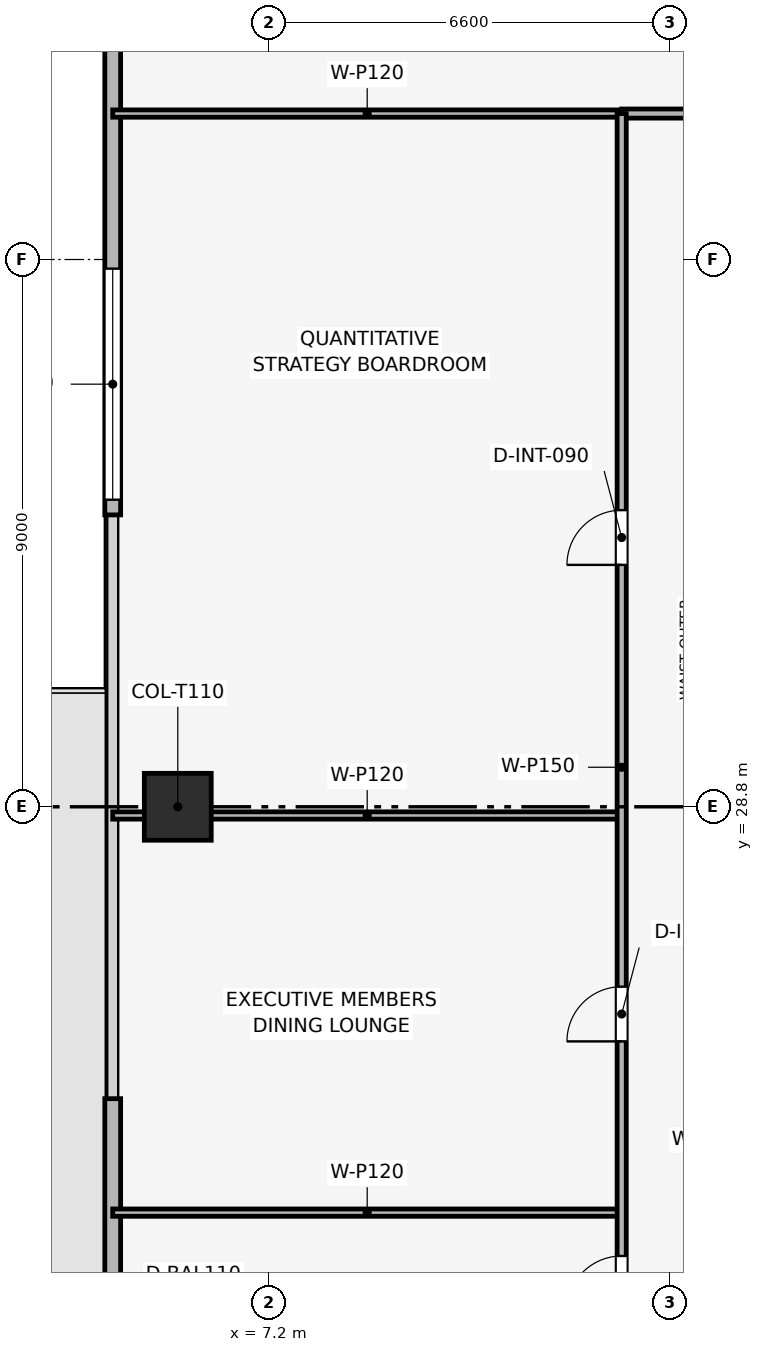
"""IFC4 building model, lengths in metres.
Left out: names, types, materials, properties, quantities, classifications, styles, units other than length and angle.
Written with IfcOpenShell. Run it as: python <this file> out.ifc"""

import sys

from ifc_helpers import new_model, si_unit, direction, frame, frame_2d, origin, origin_2d, place, context, subcontext, project, spatial, rectangle, extrude, element, fill, save


model = new_model("IFC4")
c1 = context("Model", 3, precision=1e-05, world=origin(), true_north=direction((0.0, 1.0)))
c2 = subcontext(c1, "Body", "Model", "MODEL_VIEW")
j1 = project(units=[si_unit("LENGTHUNIT", "METRE"), si_unit("PLANEANGLEUNIT", "RADIAN")], contexts=[c1])
p1 = place(None, origin())
s1 = spatial("IfcSite", under=j1, at=p1, CompositionType="ELEMENT")
p2 = place(p1, origin())
s2 = spatial("IfcBuilding", under=s1, at=p2, CompositionType="ELEMENT")
p3 = place(p2, frame((0.0, 0.0, 179.55)))
s3 = spatial("IfcBuildingStorey", under=s2, at=p3, CompositionType="ELEMENT", Elevation=179.55)
p4 = place(p3, frame((5.7, 28.8, 0.003), z_axis=(0.0, 0.0, 1.0), x_axis=(1.0, 0.0, 0.0)))
e1 = element("IfcColumn", 1, at=p4, inside=s3, PredefinedType="COLUMN", context=c2, shape_type="SweptSolid", body=[
    extrude(rectangle(XDim=1.1, YDim=1.1, at=origin_2d()), origin(), (0.0, 0.0, 1.0), 3.489),
])
p5 = place(p3, frame((4.63, 11.4, 0.0), z_axis=(0.0, 0.0, 1.0), x_axis=(0.0, 1.0, 0.0)))
e2 = element("IfcWall", 2, at=p5, inside=s3, PredefinedType="SOLIDWALL", context=c2, shape_type="SweptSolid", body=[
    extrude(rectangle(XDim=12.6, YDim=0.26, at=frame_2d((6.3, 0.0))), origin(), (0.0, 0.0, 1.0), 3.495),
])
p6 = place(p5, frame((7.822, 0.0, 0.0)))
e3 = element("IfcOpeningElement", 3, at=p6, cuts=e2, PredefinedType="OPENING", context=c2, shape_type="SweptSolid", body=[
    extrude(rectangle(XDim=1.1, YDim=2.2, at=frame_2d((0.55, 1.1))), frame((0.0, 0.14, 0.0), z_axis=(0.0, -1.0, 0.0), x_axis=(1.0, 0.0, 0.0)), (0.0, 0.0, 1.0), 0.28),
])
p7 = place(p3, frame((4.63, 33.6, 0.0), z_axis=(0.0, 0.0, 1.0), x_axis=(0.0, 1.0, 0.0)))
e4 = element("IfcWall", 4, at=p7, inside=s3, PredefinedType="SOLIDWALL", context=c2, shape_type="SweptSolid", body=[
    extrude(rectangle(XDim=12.6, YDim=0.26, at=frame_2d((6.3, 0.0))), origin(), (0.0, 0.0, 1.0), 3.495),
])
p8 = place(p7, frame((0.25, 0.0, 0.9)))
e5 = element("IfcOpeningElement", 5, at=p8, cuts=e4, PredefinedType="OPENING", context=c2, shape_type="SweptSolid", body=[
    extrude(rectangle(XDim=3.8, YDim=1.9, at=frame_2d((1.9, 0.95))), frame((0.0, 0.14, 0.0), z_axis=(0.0, -1.0, 0.0), x_axis=(1.0, 0.0, 0.0)), (0.0, 0.0, 1.0), 0.28),
])
for number, where, z_axis, x_axis in (
    (6, (4.63, 22.126, 0.0), (0.0, 0.0, 1.0), (1.0, 0.0, 0.0)),
    (7, (4.63, 28.657, 0.0), (0.0, 0.0, 1.0), (1.0, 0.0, 0.0)),
    (8, (4.63, 40.2, 0.0), (0.0, 0.0, 1.0), (1.0, 0.0, 0.0)),
):
    element("IfcWall", number, at=place(p3, frame(where, z_axis=z_axis, x_axis=x_axis)), inside=s3, PredefinedType="PARTITIONING", context=c2, shape_type="SweptSolid", body=[
        extrude(rectangle(XDim=8.37, YDim=0.12, at=frame_2d((4.185, 0.0))), origin(), (0.0, 0.0, 1.0), 2.98),
    ])
p9 = place(p3, frame((13.0, 40.2, 0.0), z_axis=(0.0, 0.0, 1.0), x_axis=(1.0, 0.0, 0.0)))
e9 = element("IfcWall", 9, at=p9, inside=s3, PredefinedType="PARTITIONING", context=c2, shape_type="SweptSolid", body=[
    extrude(rectangle(XDim=31.6, YDim=0.15, at=frame_2d((15.8, 0.0))), origin(), (0.0, 0.0, 1.0), 3.03),
])
p10 = place(p9, frame((15.35, 0.0, 0.0)))
e10 = element("IfcOpeningElement", 10, at=p10, cuts=e9, PredefinedType="OPENING", context=c2, shape_type="SweptSolid", body=[
    extrude(rectangle(XDim=0.9, YDim=2.1, at=frame_2d((0.45, 1.05))), frame((0.0, 0.085, 0.0), z_axis=(0.0, -1.0, 0.0), x_axis=(1.0, 0.0, 0.0)), (0.0, 0.0, 1.0), 0.17),
])
p11 = place(p3, frame((13.0, 17.4, 0.0), z_axis=(0.0, 0.0, 1.0), x_axis=(0.0, 1.0, 0.0)))
e11 = element("IfcWall", 11, at=p11, inside=s3, PredefinedType="PARTITIONING", context=c2, shape_type="SweptSolid", body=[
    extrude(rectangle(XDim=22.8, YDim=0.15, at=frame_2d((11.4, 0.0))), origin(), (0.0, 0.0, 1.0), 3.03),
])
p12 = place(p11, frame((3.113, 0.0, 0.0)))
e12 = element("IfcOpeningElement", 12, at=p12, cuts=e11, PredefinedType="OPENING", context=c2, shape_type="SweptSolid", body=[
    extrude(rectangle(XDim=0.9, YDim=2.1, at=frame_2d((0.45, 1.05))), frame((0.0, 0.085, 0.0), z_axis=(0.0, -1.0, 0.0), x_axis=(1.0, 0.0, 0.0)), (0.0, 0.0, 1.0), 0.17),
])
p13 = place(p11, frame((7.542, 0.0, 0.0)))
e13 = element("IfcOpeningElement", 13, at=p13, cuts=e11, PredefinedType="OPENING", context=c2, shape_type="SweptSolid", body=[
    extrude(rectangle(XDim=0.9, YDim=2.1, at=frame_2d((0.45, 1.05))), frame((0.0, 0.085, 0.0), z_axis=(0.0, -1.0, 0.0), x_axis=(1.0, 0.0, 0.0)), (0.0, 0.0, 1.0), 0.17),
])
p14 = place(p11, frame((15.378, 0.0, 0.0)))
e14 = element("IfcOpeningElement", 14, at=p14, cuts=e11, PredefinedType="OPENING", context=c2, shape_type="SweptSolid", body=[
    extrude(rectangle(XDim=0.9, YDim=2.1, at=frame_2d((0.45, 1.05))), frame((0.0, 0.085, 0.0), z_axis=(0.0, -1.0, 0.0), x_axis=(1.0, 0.0, 0.0)), (0.0, 0.0, 1.0), 0.17),
])
p15 = place(p8, origin())
e15 = element("IfcWindow", 15, at=p15, inside=s3, PartitioningType="SINGLE_PANEL", PredefinedType="WINDOW", context=c2, shape_type="SweptSolid", body=[
    extrude(rectangle(XDim=3.8, YDim=1.9, at=frame_2d((1.9, 0.95))), frame((0.0, 0.03, 0.0), z_axis=(0.0, -1.0, 0.0), x_axis=(1.0, 0.0, 0.0)), (0.0, 0.0, 1.0), 0.06),
])
fill(e5, e15)
p16 = place(p12, origin())
e16 = element("IfcDoor", 16, at=p16, inside=s3, OperationType="SINGLE_SWING_LEFT", PredefinedType="DOOR", context=c2, shape_type="SweptSolid", body=[
    extrude(rectangle(XDim=0.9, YDim=2.1, at=frame_2d((0.45, 1.05))), frame((0.0, 0.025, 0.0), z_axis=(0.0, -1.0, 0.0), x_axis=(1.0, 0.0, 0.0)), (0.0, 0.0, 1.0), 0.05),
])
fill(e12, e16)
p17 = place(p13, origin())
e17 = element("IfcDoor", 17, at=p17, inside=s3, OperationType="SINGLE_SWING_LEFT", PredefinedType="DOOR", context=c2, shape_type="SweptSolid", body=[
    extrude(rectangle(XDim=0.9, YDim=2.1, at=frame_2d((0.45, 1.05))), frame((0.0, 0.025, 0.0), z_axis=(0.0, -1.0, 0.0), x_axis=(1.0, 0.0, 0.0)), (0.0, 0.0, 1.0), 0.05),
])
fill(e13, e17)
p18 = place(p14, origin())
e18 = element("IfcDoor", 18, at=p18, inside=s3, OperationType="SINGLE_SWING_LEFT", PredefinedType="DOOR", context=c2, shape_type="SweptSolid", body=[
    extrude(rectangle(XDim=0.9, YDim=2.1, at=frame_2d((0.45, 1.05))), frame((0.0, 0.025, 0.0), z_axis=(0.0, -1.0, 0.0), x_axis=(1.0, 0.0, 0.0)), (0.0, 0.0, 1.0), 0.05),
])
fill(e14, e18)
save(model, sys.argv[1])
